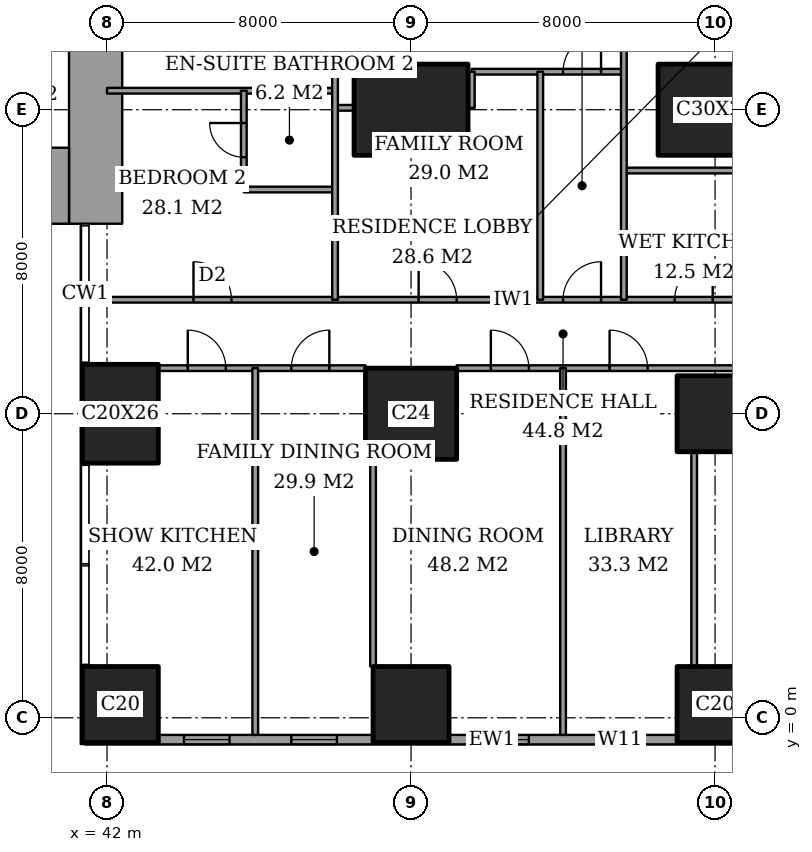
"""IFC4 building model, lengths in metres.
Left out: names, types, materials, properties, quantities, classifications, styles, units other than length and angle.
Written with IfcOpenShell. Run it as: python <this file> out.ifc"""

import sys

from ifc_helpers import new_model, si_unit, direction, frame, frame_2d, origin, origin_2d, place, context, subcontext, project, spatial, rectangle, extrude, element, fill, save


model = new_model("IFC4")
c1 = context("Model", 3, precision=1e-05, world=origin(), true_north=direction((0.0, 1.0)))
c2 = subcontext(c1, "Body", "Model", "MODEL_VIEW")
j1 = project(units=[si_unit("LENGTHUNIT", "METRE"), si_unit("PLANEANGLEUNIT", "RADIAN")], contexts=[c1])
p1 = place(None, origin())
s1 = spatial("IfcSite", under=j1, at=p1, CompositionType="ELEMENT")
p2 = place(p1, origin())
s2 = spatial("IfcBuilding", under=s1, at=p2, CompositionType="ELEMENT")
p3 = place(p2, frame((0.0, 0.0, 121.4)))
s3 = spatial("IfcBuildingStorey", under=s2, at=p3, CompositionType="ELEMENT", Elevation=121.4)
p4 = place(p3, frame((42.35, 0.35, 0.0), z_axis=(0.0, 0.0, 1.0), x_axis=(1.0, 0.0, 0.0)))
e1 = element("IfcColumn", 1, at=p4, inside=s3, PredefinedType="COLUMN", context=c2, shape_type="SweptSolid", body=[
    extrude(rectangle(XDim=2.0, YDim=2.0, at=origin_2d()), origin(), (0.0, 0.0, 1.0), 3.6),
])
p5 = place(p3, frame((42.35, 8.0, 0.0), z_axis=(0.0, 0.0, 1.0), x_axis=(1.0, 0.0, 0.0)))
e2 = element("IfcColumn", 2, at=p5, inside=s3, PredefinedType="COLUMN", context=c2, shape_type="SweptSolid", body=[
    extrude(rectangle(XDim=2.0, YDim=2.6, at=origin_2d()), origin(), (0.0, 0.0, 1.0), 3.6),
])
p6 = place(p3, frame((50.0, 0.35, 0.0), z_axis=(0.0, 0.0, 1.0), x_axis=(1.0, 0.0, 0.0)))
e3 = element("IfcColumn", 3, at=p6, inside=s3, PredefinedType="COLUMN", context=c2, shape_type="SweptSolid", body=[
    extrude(rectangle(XDim=2.0, YDim=2.0, at=origin_2d()), origin(), (0.0, 0.0, 1.0), 3.6),
])
p7 = place(p3, frame((50.0, 8.0, 0.0), z_axis=(0.0, 0.0, 1.0), x_axis=(1.0, 0.0, 0.0)))
e4 = element("IfcColumn", 4, at=p7, inside=s3, PredefinedType="COLUMN", context=c2, shape_type="SweptSolid", body=[
    extrude(rectangle(XDim=2.4, YDim=2.4, at=origin_2d()), origin(), (0.0, 0.0, 1.0), 3.6),
])
p8 = place(p3, frame((50.0, 16.0, 0.0), z_axis=(0.0, 0.0, 1.0), x_axis=(1.0, 0.0, 0.0)))
e5 = element("IfcColumn", 5, at=p8, inside=s3, PredefinedType="COLUMN", context=c2, shape_type="SweptSolid", body=[
    extrude(rectangle(XDim=3.0, YDim=2.4, at=origin_2d()), origin(), (0.0, 0.0, 1.0), 3.6),
])
for number, where, z_axis, x_axis in (
    (6, (58.0, 0.35, 0.0), (0.0, 0.0, 1.0), (1.0, 0.0, 0.0)),
    (7, (58.0, 8.0, 0.0), (0.0, 0.0, 1.0), (1.0, 0.0, 0.0)),
):
    element("IfcColumn", number, at=place(p3, frame(where, z_axis=z_axis, x_axis=x_axis)), inside=s3, PredefinedType="COLUMN", context=c2, shape_type="SweptSolid", body=[
        extrude(rectangle(XDim=2.0, YDim=2.0, at=origin_2d()), origin(), (0.0, 0.0, 1.0), 3.6),
    ])
p9 = place(p3, frame((58.0, 16.0, 0.0), z_axis=(0.0, 0.0, 1.0), x_axis=(1.0, 0.0, 0.0)))
e8 = element("IfcColumn", 8, at=p9, inside=s3, PredefinedType="COLUMN", context=c2, shape_type="SweptSolid", body=[
    extrude(rectangle(XDim=3.0, YDim=2.4, at=origin_2d()), origin(), (0.0, 0.0, 1.0), 3.6),
])
p10 = place(p3, frame((37.85, 14.0, 0.0), z_axis=(0.0, 0.0, 1.0), x_axis=(1.0, 0.0, 0.0)))
e9 = element("IfcWall", 9, at=p10, inside=s3, PredefinedType="SHEAR", context=c2, shape_type="SweptSolid", body=[
    extrude(rectangle(XDim=3.15, YDim=2.0, at=frame_2d((1.575, 0.0))), origin(), (0.0, 0.0, 1.0), 3.6),
])
p11 = place(p3, frame((41.7, 13.0, 0.0), z_axis=(0.0, 0.0, 1.0), x_axis=(0.0, 1.0, 0.0)))
e10 = element("IfcWall", 10, at=p11, inside=s3, PredefinedType="SHEAR", context=c2, shape_type="SweptSolid", body=[
    extrude(rectangle(XDim=11.85, YDim=1.4, at=frame_2d((5.925, 0.0))), origin(), (0.0, 0.0, 1.0), 3.6),
])
p12 = place(p11, frame((7.5, 0.0, 0.0)))
e11 = element("IfcOpeningElement", 11, at=p12, cuts=e10, PredefinedType="OPENING", context=c2, shape_type="SweptSolid", body=[
    extrude(rectangle(XDim=1.8, YDim=2.4, at=frame_2d((0.9, 1.2))), frame((0.0, 0.71, 0.0), z_axis=(0.0, -1.0, 0.0), x_axis=(1.0, 0.0, 0.0)), (0.0, 0.0, 1.0), 1.42),
])
p13 = place(p3, frame((41.425, -0.575, 0.0), z_axis=(0.0, 0.0, 1.0), x_axis=(1.0, 0.0, 0.0)))
e12 = element("IfcWall", 12, at=p13, inside=s3, PredefinedType="SOLIDWALL", context=c2, shape_type="SweptSolid", body=[
    extrude(rectangle(XDim=21.4, YDim=0.25, at=frame_2d((10.7, 0.0))), origin(), (0.0, 0.0, 1.0), 3.6),
])
p14 = place(p13, frame((2.6, 0.0, 0.4)))
e13 = element("IfcOpeningElement", 13, at=p14, cuts=e12, PredefinedType="OPENING", context=c2, shape_type="SweptSolid", body=[
    extrude(rectangle(XDim=1.2, YDim=2.2, at=frame_2d((0.6, 1.1))), frame((0.0, 0.135, 0.0), z_axis=(0.0, -1.0, 0.0), x_axis=(1.0, 0.0, 0.0)), (0.0, 0.0, 1.0), 0.27),
])
p15 = place(p13, frame((5.425, 0.0, 0.4)))
e14 = element("IfcOpeningElement", 14, at=p15, cuts=e12, PredefinedType="OPENING", context=c2, shape_type="SweptSolid", body=[
    extrude(rectangle(XDim=1.2, YDim=2.2, at=frame_2d((0.6, 1.1))), frame((0.0, 0.135, 0.0), z_axis=(0.0, -1.0, 0.0), x_axis=(1.0, 0.0, 0.0)), (0.0, 0.0, 1.0), 0.27),
])
p16 = place(p13, frame((10.475, 0.0, 0.4)))
e15 = element("IfcOpeningElement", 15, at=p16, cuts=e12, PredefinedType="OPENING", context=c2, shape_type="SweptSolid", body=[
    extrude(rectangle(XDim=1.2, YDim=2.2, at=frame_2d((0.6, 1.1))), frame((0.0, 0.135, 0.0), z_axis=(0.0, -1.0, 0.0), x_axis=(1.0, 0.0, 0.0)), (0.0, 0.0, 1.0), 0.27),
])
p17 = place(p13, frame((13.475, 0.0, 0.4)))
e16 = element("IfcOpeningElement", 16, at=p17, cuts=e12, PredefinedType="OPENING", context=c2, shape_type="SweptSolid", body=[
    extrude(rectangle(XDim=1.2, YDim=2.2, at=frame_2d((0.6, 1.1))), frame((0.0, 0.135, 0.0), z_axis=(0.0, -1.0, 0.0), x_axis=(1.0, 0.0, 0.0)), (0.0, 0.0, 1.0), 0.27),
])
p18 = place(p13, frame((18.225, 0.0, 0.4)))
e17 = element("IfcOpeningElement", 17, at=p18, cuts=e12, PredefinedType="OPENING", context=c2, shape_type="SweptSolid", body=[
    extrude(rectangle(XDim=2.4, YDim=2.2, at=frame_2d((1.2, 1.1))), frame((0.0, 0.135, 0.0), z_axis=(0.0, -1.0, 0.0), x_axis=(1.0, 0.0, 0.0)), (0.0, 0.0, 1.0), 0.27),
])
p19 = place(p3, frame((43.35, 9.2, 0.0), z_axis=(0.0, 0.0, 1.0), x_axis=(1.0, 0.0, 0.0)))
e18 = element("IfcWall", 18, at=p19, inside=s3, PredefinedType="PARTITIONING", context=c2, shape_type="SweptSolid", body=[
    extrude(rectangle(XDim=5.45, YDim=0.15, at=frame_2d((2.725, 0.0))), origin(), (0.0, 0.0, 1.0), 3.35),
])
p20 = place(p19, frame((3.5, 0.0, 0.0)))
e19 = element("IfcOpeningElement", 19, at=p20, cuts=e18, PredefinedType="OPENING", context=c2, shape_type="SweptSolid", body=[
    extrude(rectangle(XDim=1.0, YDim=2.1, at=frame_2d((0.5, 1.05))), frame((0.0, 0.085, 0.0), z_axis=(0.0, -1.0, 0.0), x_axis=(1.0, 0.0, 0.0)), (0.0, 0.0, 1.0), 0.17),
])
p21 = place(p19, frame((0.775, 0.0, 0.0)))
e20 = element("IfcOpeningElement", 20, at=p21, cuts=e18, PredefinedType="OPENING", context=c2, shape_type="SweptSolid", body=[
    extrude(rectangle(XDim=1.0, YDim=2.1, at=frame_2d((0.5, 1.05))), frame((0.0, 0.085, 0.0), z_axis=(0.0, -1.0, 0.0), x_axis=(1.0, 0.0, 0.0)), (0.0, 0.0, 1.0), 0.17),
])
p22 = place(p3, frame((51.2, 9.2, 0.0), z_axis=(0.0, 0.0, 1.0), x_axis=(1.0, 0.0, 0.0)))
e21 = element("IfcWall", 21, at=p22, inside=s3, PredefinedType="PARTITIONING", context=c2, shape_type="SweptSolid", body=[
    extrude(rectangle(XDim=15.25, YDim=0.15, at=frame_2d((7.625, 0.0))), origin(), (0.0, 0.0, 1.0), 3.35),
])
p23 = place(p22, frame((10.25, 0.0, 0.0)))
e22 = element("IfcOpeningElement", 22, at=p23, cuts=e21, PredefinedType="OPENING", context=c2, shape_type="SweptSolid", body=[
    extrude(rectangle(XDim=1.0, YDim=2.1, at=frame_2d((0.5, 1.05))), frame((0.0, 0.085, 0.0), z_axis=(0.0, -1.0, 0.0), x_axis=(1.0, 0.0, 0.0)), (0.0, 0.0, 1.0), 0.17),
])
p24 = place(p22, frame((4.025, 0.0, 0.0)))
e23 = element("IfcOpeningElement", 23, at=p24, cuts=e21, PredefinedType="OPENING", context=c2, shape_type="SweptSolid", body=[
    extrude(rectangle(XDim=1.0, YDim=2.1, at=frame_2d((0.5, 1.05))), frame((0.0, 0.085, 0.0), z_axis=(0.0, -1.0, 0.0), x_axis=(1.0, 0.0, 0.0)), (0.0, 0.0, 1.0), 0.17),
])
p25 = place(p22, frame((0.9, 0.0, 0.0)))
e24 = element("IfcOpeningElement", 24, at=p25, cuts=e21, PredefinedType="OPENING", context=c2, shape_type="SweptSolid", body=[
    extrude(rectangle(XDim=1.0, YDim=2.1, at=frame_2d((0.5, 1.05))), frame((0.0, 0.085, 0.0), z_axis=(0.0, -1.0, 0.0), x_axis=(1.0, 0.0, 0.0)), (0.0, 0.0, 1.0), 0.17),
])
p26 = place(p3, frame((41.439, 11.0, 0.0), z_axis=(0.0, 0.0, 1.0), x_axis=(1.0, 0.0, 0.0)))
e25 = element("IfcWall", 25, at=p26, inside=s3, PredefinedType="PARTITIONING", context=c2, shape_type="SweptSolid", body=[
    extrude(rectangle(XDim=25.011, YDim=0.15, at=frame_2d((12.505, 0.0))), origin(), (0.0, 0.0, 1.0), 3.35),
])
p27 = place(p26, frame((12.561, 0.0, 0.0)))
e26 = element("IfcOpeningElement", 26, at=p27, cuts=e25, PredefinedType="OPENING", context=c2, shape_type="SweptSolid", body=[
    extrude(rectangle(XDim=1.0, YDim=2.1, at=frame_2d((0.5, 1.05))), frame((0.0, 0.085, 0.0), z_axis=(0.0, -1.0, 0.0), x_axis=(1.0, 0.0, 0.0)), (0.0, 0.0, 1.0), 0.17),
])
p28 = place(p26, frame((20.924, 0.0, 0.0)))
e27 = element("IfcOpeningElement", 27, at=p28, cuts=e25, PredefinedType="OPENING", context=c2, shape_type="SweptSolid", body=[
    extrude(rectangle(XDim=1.0, YDim=2.1, at=frame_2d((0.5, 1.05))), frame((0.0, 0.085, 0.0), z_axis=(0.0, -1.0, 0.0), x_axis=(1.0, 0.0, 0.0)), (0.0, 0.0, 1.0), 0.17),
])
p29 = place(p26, frame((15.499, 0.0, 0.0)))
e28 = element("IfcOpeningElement", 28, at=p29, cuts=e25, PredefinedType="OPENING", context=c2, shape_type="SweptSolid", body=[
    extrude(rectangle(XDim=1.0, YDim=2.1, at=frame_2d((0.5, 1.05))), frame((0.0, 0.085, 0.0), z_axis=(0.0, -1.0, 0.0), x_axis=(1.0, 0.0, 0.0)), (0.0, 0.0, 1.0), 0.17),
])
p30 = place(p26, frame((8.761, 0.0, 0.0)))
e29 = element("IfcOpeningElement", 29, at=p30, cuts=e25, PredefinedType="OPENING", context=c2, shape_type="SweptSolid", body=[
    extrude(rectangle(XDim=1.0, YDim=2.1, at=frame_2d((0.5, 1.05))), frame((0.0, 0.085, 0.0), z_axis=(0.0, -1.0, 0.0), x_axis=(1.0, 0.0, 0.0)), (0.0, 0.0, 1.0), 0.17),
])
p31 = place(p26, frame((2.836, 0.0, 0.0)))
e30 = element("IfcOpeningElement", 30, at=p31, cuts=e25, PredefinedType="OPENING", context=c2, shape_type="SweptSolid", body=[
    extrude(rectangle(XDim=1.0, YDim=2.1, at=frame_2d((0.5, 1.05))), frame((0.0, 0.085, 0.0), z_axis=(0.0, -1.0, 0.0), x_axis=(1.0, 0.0, 0.0)), (0.0, 0.0, 1.0), 0.17),
])
p32 = place(p3, frame((45.6, 13.9, 0.0), z_axis=(0.0, 0.0, 1.0), x_axis=(1.0, 0.0, 0.0)))
e31 = element("IfcWall", 31, at=p32, inside=s3, PredefinedType="PARTITIONING", context=c2, shape_type="SweptSolid", body=[
    extrude(rectangle(XDim=2.4, YDim=0.15, at=frame_2d((1.2, 0.0))), origin(), (0.0, 0.0, 1.0), 3.35),
])
p33 = place(p3, frame((55.6, 14.4, 0.0), z_axis=(0.0, 0.0, 1.0), x_axis=(1.0, 0.0, 0.0)))
e32 = element("IfcWall", 32, at=p33, inside=s3, PredefinedType="PARTITIONING", context=c2, shape_type="SweptSolid", body=[
    extrude(rectangle(XDim=3.675, YDim=0.15, at=frame_2d((1.837, 0.0))), origin(), (0.0, 0.0, 1.0), 3.35),
])
p34 = place(p3, frame((48.0, 16.05, 0.0), z_axis=(0.0, 0.0, 1.0), x_axis=(1.0, 0.0, 0.0)))
e33 = element("IfcWall", 33, at=p34, inside=s3, PredefinedType="PARTITIONING", context=c2, shape_type="SweptSolid", body=[
    extrude(rectangle(XDim=0.5, YDim=0.15, at=frame_2d((0.25, 0.0))), origin(), (0.0, 0.0, 1.0), 2.634),
])
p35 = place(p3, frame((42.0, 16.5, 0.0), z_axis=(0.0, 0.0, 1.0), x_axis=(1.0, 0.0, 0.0)))
e34 = element("IfcWall", 34, at=p35, inside=s3, PredefinedType="PARTITIONING", context=c2, shape_type="SweptSolid", body=[
    extrude(rectangle(XDim=6.0, YDim=0.15, at=frame_2d((3.0, 0.0))), origin(), (0.0, 0.0, 1.0), 3.35),
])
p36 = place(p3, frame((51.6, 17.0, 0.0), z_axis=(0.0, 0.0, 1.0), x_axis=(1.0, 0.0, 0.0)))
e35 = element("IfcWall", 35, at=p36, inside=s3, PredefinedType="PARTITIONING", context=c2, shape_type="SweptSolid", body=[
    extrude(rectangle(XDim=4.0, YDim=0.15, at=frame_2d((2.0, 0.0))), origin(), (0.0, 0.0, 1.0), 3.35),
])
p37 = place(p36, frame((2.4, 0.0, 0.0)))
e36 = element("IfcOpeningElement", 36, at=p37, cuts=e35, PredefinedType="OPENING", context=c2, shape_type="SweptSolid", body=[
    extrude(rectangle(XDim=1.0, YDim=2.1, at=frame_2d((0.5, 1.05))), frame((0.0, 0.085, 0.0), z_axis=(0.0, -1.0, 0.0), x_axis=(1.0, 0.0, 0.0)), (0.0, 0.0, 1.0), 0.17),
])
p38 = place(p3, frame((45.6, 13.9, 0.0), z_axis=(0.0, 0.0, 1.0), x_axis=(0.0, 1.0, 0.0)))
e37 = element("IfcWall", 37, at=p38, inside=s3, PredefinedType="PARTITIONING", context=c2, shape_type="SweptSolid", body=[
    extrude(rectangle(XDim=2.6, YDim=0.15, at=frame_2d((1.3, 0.0))), origin(), (0.0, 0.0, 1.0), 3.35),
])
p39 = place(p38, frame((0.85, 0.0, 0.0)))
e38 = element("IfcOpeningElement", 38, at=p39, cuts=e37, PredefinedType="OPENING", context=c2, shape_type="SweptSolid", body=[
    extrude(rectangle(XDim=0.9, YDim=2.1, at=frame_2d((0.45, 1.05))), frame((0.0, 0.085, 0.0), z_axis=(0.0, -1.0, 0.0), x_axis=(1.0, 0.0, 0.0)), (0.0, 0.0, 1.0), 0.17),
])
p40 = place(p3, frame((45.9, -0.45, 0.0), z_axis=(0.0, 0.0, 1.0), x_axis=(0.0, 1.0, 0.0)))
e39 = element("IfcWall", 39, at=p40, inside=s3, PredefinedType="PARTITIONING", context=c2, shape_type="SweptSolid", body=[
    extrude(rectangle(XDim=9.65, YDim=0.15, at=frame_2d((4.825, 0.0))), origin(), (0.0, 0.0, 1.0), 3.35),
])
p41 = place(p3, frame((48.0, 17.0, 0.0), z_axis=(0.0, 0.0, 1.0), x_axis=(0.0, 1.0, 0.0)))
e40 = element("IfcWall", 40, at=p41, inside=s3, PredefinedType="PARTITIONING", context=c2, shape_type="SweptSolid", body=[
    extrude(rectangle(XDim=7.0, YDim=0.2, at=frame_2d((3.5, 0.0))), origin(), (0.0, 0.0, 1.0), 3.35),
])
p42 = place(p41, frame((4.4, 0.0, 0.0)))
e41 = element("IfcOpeningElement", 41, at=p42, cuts=e40, PredefinedType="OPENING", context=c2, shape_type="SweptSolid", body=[
    extrude(rectangle(XDim=1.2, YDim=2.4, at=frame_2d((0.6, 1.2))), frame((0.0, 0.11, 0.0), z_axis=(0.0, -1.0, 0.0), x_axis=(1.0, 0.0, 0.0)), (0.0, 0.0, 1.0), 0.22),
])
p43 = place(p41, frame((1.05, 0.0, 0.0)))
e42 = element("IfcOpeningElement", 42, at=p43, cuts=e40, PredefinedType="OPENING", context=c2, shape_type="SweptSolid", body=[
    extrude(rectangle(XDim=0.9, YDim=2.1, at=frame_2d((0.45, 1.05))), frame((0.0, 0.11, 0.0), z_axis=(0.0, -1.0, 0.0), x_axis=(1.0, 0.0, 0.0)), (0.0, 0.0, 1.0), 0.22),
])
p44 = place(p3, frame((48.0, 11.0, 0.0), z_axis=(0.0, 0.0, 1.0), x_axis=(0.0, 1.0, 0.0)))
e43 = element("IfcWall", 43, at=p44, inside=s3, PredefinedType="PARTITIONING", context=c2, shape_type="SweptSolid", body=[
    extrude(rectangle(XDim=6.0, YDim=0.15, at=frame_2d((3.0, 0.0))), origin(), (0.0, 0.0, 1.0), 3.35),
])
p45 = place(p3, frame((49.0, 1.35, 0.0), z_axis=(0.0, 0.0, 1.0), x_axis=(0.0, 1.0, 0.0)))
e44 = element("IfcWall", 44, at=p45, inside=s3, PredefinedType="PARTITIONING", context=c2, shape_type="SweptSolid", body=[
    extrude(rectangle(XDim=5.45, YDim=0.15, at=frame_2d((2.725, 0.0))), origin(), (0.0, 0.0, 1.0), 3.35),
])
p46 = place(p3, frame((51.6, 16.05, 0.0), z_axis=(0.0, 0.0, 1.0), x_axis=(0.0, 1.0, 0.0)))
e45 = element("IfcWall", 45, at=p46, inside=s3, PredefinedType="PARTITIONING", context=c2, shape_type="SweptSolid", body=[
    extrude(rectangle(XDim=0.95, YDim=0.15, at=frame_2d((0.475, 0.0))), origin(), (0.0, 0.0, 1.0), 3.35),
])
p47 = place(p3, frame((53.4, 11.0, 0.0), z_axis=(0.0, 0.0, 1.0), x_axis=(0.0, 1.0, 0.0)))
e46 = element("IfcWall", 46, at=p47, inside=s3, PredefinedType="PARTITIONING", context=c2, shape_type="SweptSolid", body=[
    extrude(rectangle(XDim=6.0, YDim=0.15, at=frame_2d((3.0, 0.0))), origin(), (0.0, 0.0, 1.0), 3.35),
])
p48 = place(p3, frame((54.0, -0.45, 0.0), z_axis=(0.0, 0.0, 1.0), x_axis=(0.0, 1.0, 0.0)))
e47 = element("IfcWall", 47, at=p48, inside=s3, PredefinedType="PARTITIONING", context=c2, shape_type="SweptSolid", body=[
    extrude(rectangle(XDim=9.65, YDim=0.15, at=frame_2d((4.825, 0.0))), origin(), (0.0, 0.0, 1.0), 3.35),
])
p49 = place(p3, frame((55.6, 11.0, 0.0), z_axis=(0.0, 0.0, 1.0), x_axis=(0.0, 1.0, 0.0)))
e48 = element("IfcWall", 48, at=p49, inside=s3, PredefinedType="PARTITIONING", context=c2, shape_type="SweptSolid", body=[
    extrude(rectangle(XDim=10.6, YDim=0.15, at=frame_2d((5.3, 0.0))), origin(), (0.0, 0.0, 1.0), 3.35),
])
p50 = place(p49, frame((7.8, 0.0, 0.0)))
e49 = element("IfcOpeningElement", 49, at=p50, cuts=e48, PredefinedType="OPENING", context=c2, shape_type="SweptSolid", body=[
    extrude(rectangle(XDim=1.0, YDim=2.1, at=frame_2d((0.5, 1.05))), frame((0.0, 0.085, 0.0), z_axis=(0.0, -1.0, 0.0), x_axis=(1.0, 0.0, 0.0)), (0.0, 0.0, 1.0), 0.17),
])
p51 = place(p3, frame((57.45, 1.35, 0.0), z_axis=(0.0, 0.0, 1.0), x_axis=(0.0, 1.0, 0.0)))
e50 = element("IfcWall", 50, at=p51, inside=s3, PredefinedType="PARTITIONING", context=c2, shape_type="SweptSolid", body=[
    extrude(rectangle(XDim=5.65, YDim=0.15, at=frame_2d((2.825, 0.0))), origin(), (0.0, 0.0, 1.0), 3.35),
])
p52 = place(p14, origin())
e51 = element("IfcWindow", 51, at=p52, inside=s3, PartitioningType="SINGLE_PANEL", PredefinedType="WINDOW", context=c2, shape_type="SweptSolid", body=[
    extrude(rectangle(XDim=1.2, YDim=2.2, at=frame_2d((0.6, 1.1))), frame((0.0, 0.03, 0.0), z_axis=(0.0, -1.0, 0.0), x_axis=(1.0, 0.0, 0.0)), (0.0, 0.0, 1.0), 0.06),
])
fill(e13, e51)
p53 = place(p15, origin())
e52 = element("IfcWindow", 52, at=p53, inside=s3, PartitioningType="SINGLE_PANEL", PredefinedType="WINDOW", context=c2, shape_type="SweptSolid", body=[
    extrude(rectangle(XDim=1.2, YDim=2.2, at=frame_2d((0.6, 1.1))), frame((0.0, 0.03, 0.0), z_axis=(0.0, -1.0, 0.0), x_axis=(1.0, 0.0, 0.0)), (0.0, 0.0, 1.0), 0.06),
])
fill(e14, e52)
p54 = place(p16, origin())
e53 = element("IfcWindow", 53, at=p54, inside=s3, PartitioningType="SINGLE_PANEL", PredefinedType="WINDOW", context=c2, shape_type="SweptSolid", body=[
    extrude(rectangle(XDim=1.2, YDim=2.2, at=frame_2d((0.6, 1.1))), frame((0.0, 0.03, 0.0), z_axis=(0.0, -1.0, 0.0), x_axis=(1.0, 0.0, 0.0)), (0.0, 0.0, 1.0), 0.06),
])
fill(e15, e53)
p55 = place(p17, origin())
e54 = element("IfcWindow", 54, at=p55, inside=s3, PartitioningType="SINGLE_PANEL", PredefinedType="WINDOW", context=c2, shape_type="SweptSolid", body=[
    extrude(rectangle(XDim=1.2, YDim=2.2, at=frame_2d((0.6, 1.1))), frame((0.0, 0.03, 0.0), z_axis=(0.0, -1.0, 0.0), x_axis=(1.0, 0.0, 0.0)), (0.0, 0.0, 1.0), 0.06),
])
fill(e16, e54)
p56 = place(p24, origin())
e55 = element("IfcDoor", 55, at=p56, inside=s3, OperationType="SINGLE_SWING_RIGHT", PredefinedType="DOOR", context=c2, shape_type="SweptSolid", body=[
    extrude(rectangle(XDim=1.0, YDim=2.1, at=frame_2d((0.5, 1.05))), frame((0.0, 0.025, 0.0), z_axis=(0.0, -1.0, 0.0), x_axis=(1.0, 0.0, 0.0)), (0.0, 0.0, 1.0), 0.05),
])
fill(e23, e55)
p57 = place(p25, origin())
e56 = element("IfcDoor", 56, at=p57, inside=s3, OperationType="SINGLE_SWING_RIGHT", PredefinedType="DOOR", context=c2, shape_type="SweptSolid", body=[
    extrude(rectangle(XDim=1.0, YDim=2.1, at=frame_2d((0.5, 1.05))), frame((0.0, 0.025, 0.0), z_axis=(0.0, -1.0, 0.0), x_axis=(1.0, 0.0, 0.0)), (0.0, 0.0, 1.0), 0.05),
])
fill(e24, e56)
p58 = place(p20, origin())
e57 = element("IfcDoor", 57, at=p58, inside=s3, OperationType="SINGLE_SWING_LEFT", PredefinedType="DOOR", context=c2, shape_type="SweptSolid", body=[
    extrude(rectangle(XDim=1.0, YDim=2.1, at=frame_2d((0.5, 1.05))), frame((0.0, 0.025, 0.0), z_axis=(0.0, -1.0, 0.0), x_axis=(1.0, 0.0, 0.0)), (0.0, 0.0, 1.0), 0.05),
])
fill(e19, e57)
p59 = place(p21, origin())
e58 = element("IfcDoor", 58, at=p59, inside=s3, OperationType="SINGLE_SWING_RIGHT", PredefinedType="DOOR", context=c2, shape_type="SweptSolid", body=[
    extrude(rectangle(XDim=1.0, YDim=2.1, at=frame_2d((0.5, 1.05))), frame((0.0, 0.025, 0.0), z_axis=(0.0, -1.0, 0.0), x_axis=(1.0, 0.0, 0.0)), (0.0, 0.0, 1.0), 0.05),
])
fill(e20, e58)
p60 = place(p27, origin())
e59 = element("IfcDoor", 59, at=p60, inside=s3, OperationType="SINGLE_SWING_LEFT", PredefinedType="DOOR", context=c2, shape_type="SweptSolid", body=[
    extrude(rectangle(XDim=1.0, YDim=2.1, at=frame_2d((0.5, 1.05))), frame((0.0, 0.025, 0.0), z_axis=(0.0, -1.0, 0.0), x_axis=(1.0, 0.0, 0.0)), (0.0, 0.0, 1.0), 0.05),
])
fill(e26, e59)
p61 = place(p29, origin())
e60 = element("IfcDoor", 60, at=p61, inside=s3, OperationType="SINGLE_SWING_LEFT", PredefinedType="DOOR", context=c2, shape_type="SweptSolid", body=[
    extrude(rectangle(XDim=1.0, YDim=2.1, at=frame_2d((0.5, 1.05))), frame((0.0, 0.025, 0.0), z_axis=(0.0, -1.0, 0.0), x_axis=(1.0, 0.0, 0.0)), (0.0, 0.0, 1.0), 0.05),
])
fill(e28, e60)
p62 = place(p37, origin())
e61 = element("IfcDoor", 61, at=p62, inside=s3, OperationType="SINGLE_SWING_LEFT", PredefinedType="DOOR", context=c2, shape_type="SweptSolid", body=[
    extrude(rectangle(XDim=1.0, YDim=2.1, at=frame_2d((0.5, 1.05))), frame((0.0, 0.025, 0.0), z_axis=(0.0, -1.0, 0.0), x_axis=(1.0, 0.0, 0.0)), (0.0, 0.0, 1.0), 0.05),
])
fill(e36, e61)
p63 = place(p30, origin())
e62 = element("IfcDoor", 62, at=p63, inside=s3, OperationType="SINGLE_SWING_RIGHT", PredefinedType="DOOR", context=c2, shape_type="SweptSolid", body=[
    extrude(rectangle(XDim=1.0, YDim=2.1, at=frame_2d((0.5, 1.05))), frame((0.0, 0.025, 0.0), z_axis=(0.0, -1.0, 0.0), x_axis=(1.0, 0.0, 0.0)), (0.0, 0.0, 1.0), 0.05),
])
fill(e29, e62)
p64 = place(p39, origin())
e63 = element("IfcDoor", 63, at=p64, inside=s3, OperationType="SINGLE_SWING_LEFT", PredefinedType="DOOR", context=c2, shape_type="SweptSolid", body=[
    extrude(rectangle(XDim=0.9, YDim=2.1, at=frame_2d((0.45, 1.05))), frame((0.0, 0.025, 0.0), z_axis=(0.0, -1.0, 0.0), x_axis=(1.0, 0.0, 0.0)), (0.0, 0.0, 1.0), 0.05),
])
fill(e38, e63)
p65 = place(p31, origin())
e64 = element("IfcDoor", 64, at=p65, inside=s3, OperationType="SINGLE_SWING_RIGHT", PredefinedType="DOOR", context=c2, shape_type="SweptSolid", body=[
    extrude(rectangle(XDim=1.0, YDim=2.1, at=frame_2d((0.5, 1.05))), frame((0.0, 0.025, 0.0), z_axis=(0.0, -1.0, 0.0), x_axis=(1.0, 0.0, 0.0)), (0.0, 0.0, 1.0), 0.05),
])
fill(e30, e64)
save(model, sys.argv[1])
